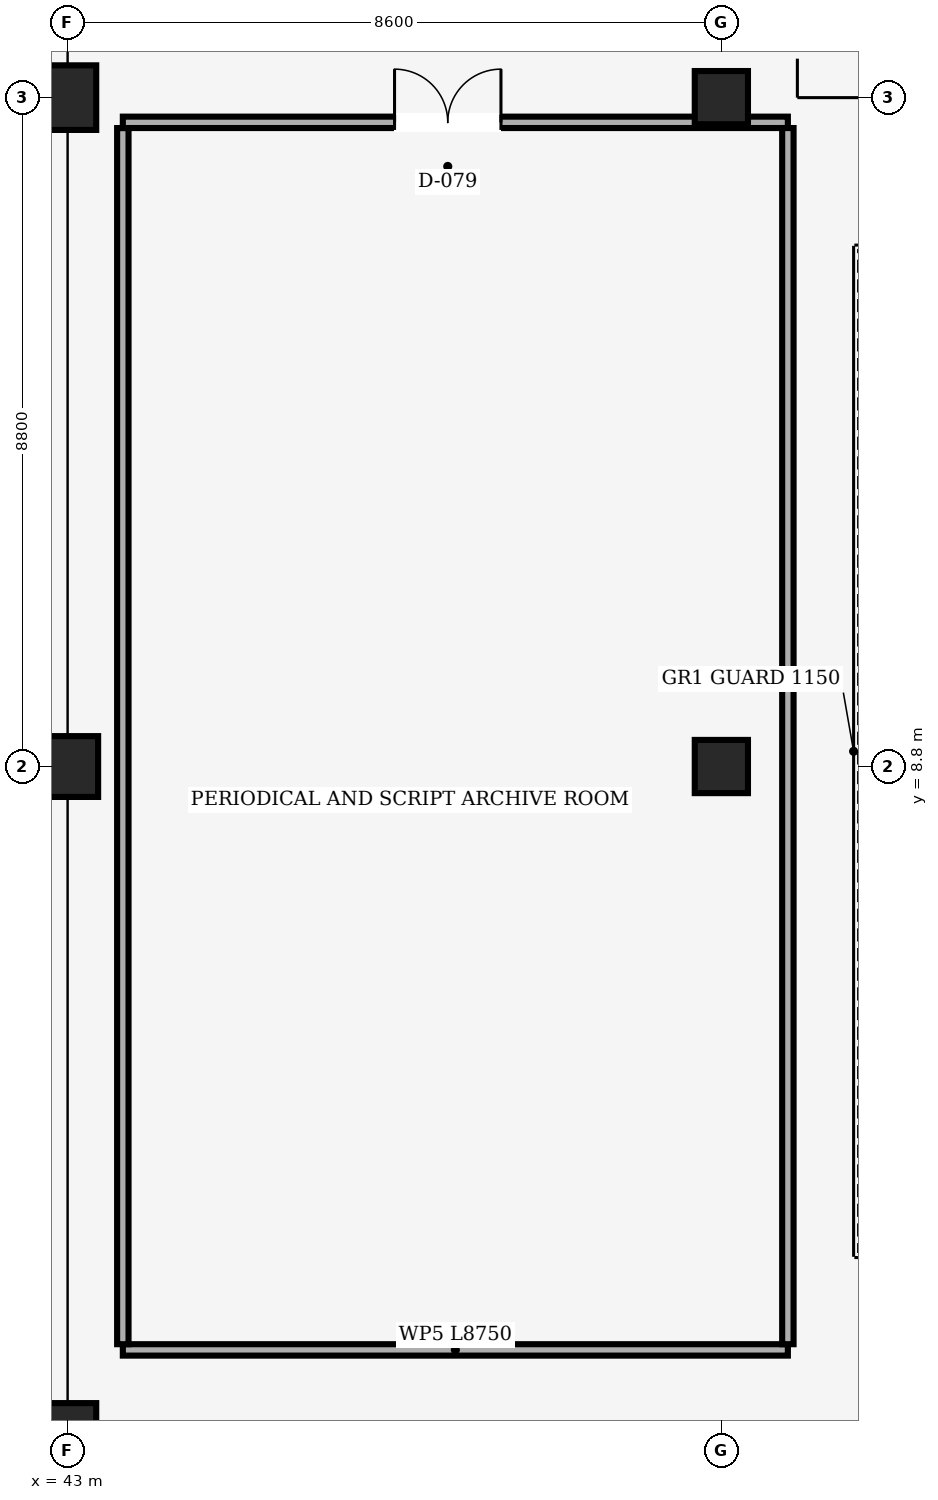
"""IFC4 building model, lengths in metres.
Left out: names, types, materials, properties, quantities, classifications, styles, units other than length and angle.
Written with IfcOpenShell. Run it as: python <this file> out.ifc"""

import sys

from ifc_helpers import new_model, si_unit, direction, frame, frame_2d, origin, origin_2d, place, context, subcontext, project, spatial, rectangle, circle, extrude, element, fill, save


model = new_model("IFC4")
c1 = context("Model", 3, precision=1e-05, world=origin(), true_north=direction((0.0, 1.0)))
c2 = subcontext(c1, "Body", "Model", "MODEL_VIEW")
j1 = project(units=[si_unit("LENGTHUNIT", "METRE"), si_unit("PLANEANGLEUNIT", "RADIAN")], contexts=[c1])
p1 = place(None, origin())
s1 = spatial("IfcSite", under=j1, at=p1, CompositionType="ELEMENT")
p2 = place(p1, origin())
s2 = spatial("IfcBuilding", under=s1, at=p2, CompositionType="ELEMENT")
p3 = place(p2, frame((0.0, 0.0, 8.4)))
s3 = spatial("IfcBuildingStorey", under=s2, at=p3, CompositionType="ELEMENT", Elevation=8.4)
p4 = place(p3, frame((43.0, 0.0, 0.0), z_axis=(0.0, 0.0, 1.0), x_axis=(1.0, 0.0, 0.0)))
e1 = element("IfcColumn", 1, at=p4, inside=s3, PredefinedType="COLUMN", context=c2, shape_type="SweptSolid", body=[
    extrude(rectangle(XDim=0.75, YDim=0.85, at=origin_2d()), origin(), (0.0, 0.0, 1.0), 3.34),
])
p5 = place(p3, frame((43.0, 8.8, 0.0), z_axis=(0.0, 0.0, 1.0), x_axis=(1.0, 0.0, 0.0)))
e2 = element("IfcColumn", 2, at=p5, inside=s3, PredefinedType="COLUMN", context=c2, shape_type="SweptSolid", body=[
    extrude(rectangle(XDim=0.8, YDim=0.8, at=origin_2d()), origin(), (0.0, 0.0, 1.0), 3.34),
])
p6 = place(p3, frame((43.0, 17.6, 0.0), z_axis=(0.0, 0.0, 1.0), x_axis=(1.0, 0.0, 0.0)))
e3 = element("IfcColumn", 3, at=p6, inside=s3, PredefinedType="COLUMN", context=c2, shape_type="SweptSolid", body=[
    extrude(rectangle(XDim=0.75, YDim=0.85, at=origin_2d()), origin(), (0.0, 0.0, 1.0), 3.34),
])
for number, where, z_axis, x_axis in (
    (4, (51.6, 8.8, 0.0), (0.0, 0.0, 1.0), (1.0, 0.0, 0.0)),
    (5, (51.6, 17.6, 0.0), (0.0, 0.0, 1.0), (1.0, 0.0, 0.0)),
):
    element("IfcColumn", number, at=place(p3, frame(where, z_axis=z_axis, x_axis=x_axis)), inside=s3, PredefinedType="COLUMN", context=c2, shape_type="SweptSolid", body=[
        extrude(circle(Radius=0.35, at=origin_2d()), origin(), (0.0, 0.0, 1.0), 3.34),
    ])
p7 = place(p3, frame((52.475, 1.125, 0.0), z_axis=(0.0, 0.0, 1.0), x_axis=(-1.0, 0.0, 0.0)))
e6 = element("IfcWall", 6, at=p7, inside=s3, PredefinedType="PARTITIONING", context=c2, shape_type="SweptSolid", body=[
    extrude(rectangle(XDim=8.75, YDim=0.15, at=frame_2d((4.375, 0.0))), origin(), (0.0, 0.0, 1.0), 3.32),
])
p8 = place(p3, frame((43.725, 1.2, 0.0), z_axis=(0.0, 0.0, 1.0), x_axis=(0.0, 1.0, 0.0)))
e7 = element("IfcWall", 7, at=p8, inside=s3, PredefinedType="PARTITIONING", context=c2, shape_type="SweptSolid", body=[
    extrude(rectangle(XDim=16.0, YDim=0.15, at=frame_2d((8.0, 0.0))), origin(), (0.0, 0.0, 1.0), 3.32),
])
p9 = place(p3, frame((43.725, 17.275, 0.0), z_axis=(0.0, 0.0, 1.0), x_axis=(1.0, 0.0, 0.0)))
e8 = element("IfcWall", 8, at=p9, inside=s3, PredefinedType="PARTITIONING", context=c2, shape_type="SweptSolid", body=[
    extrude(rectangle(XDim=8.75, YDim=0.15, at=frame_2d((4.375, 0.0))), origin(), (0.0, 0.0, 1.0), 2.62),
])
p10 = place(p9, frame((3.575, 0.0, 0.0)))
e9 = element("IfcOpeningElement", 9, at=p10, cuts=e8, PredefinedType="OPENING", context=c2, shape_type="SweptSolid", body=[
    extrude(rectangle(XDim=1.4, YDim=2.15, at=frame_2d((0.7, 1.075))), frame((0.0, 0.075, 0.0), z_axis=(0.0, -1.0, 0.0), x_axis=(1.0, 0.0, 0.0)), (0.0, 0.0, 1.0), 0.15),
])
p11 = place(p3, frame((52.475, 17.2, 0.0), z_axis=(0.0, 0.0, 1.0), x_axis=(0.0, -1.0, 0.0)))
e10 = element("IfcWall", 10, at=p11, inside=s3, PredefinedType="PARTITIONING", context=c2, shape_type="SweptSolid", body=[
    extrude(rectangle(XDim=16.0, YDim=0.15, at=frame_2d((8.0, 0.0))), origin(), (0.0, 0.0, 1.0), 3.32),
])
p12 = place(p10, origin())
e11 = element("IfcDoor", 11, at=p12, inside=s3, OperationType="DOUBLE_DOOR_SINGLE_SWING", PredefinedType="DOOR", context=c2, shape_type="SweptSolid", body=[
    extrude(rectangle(XDim=1.4, YDim=2.15, at=frame_2d((0.7, 1.075))), frame((0.0, 0.025, 0.0), z_axis=(0.0, -1.0, 0.0), x_axis=(1.0, 0.0, 0.0)), (0.0, 0.0, 1.0), 0.05),
])
fill(e9, e11)
save(model, sys.argv[1])
